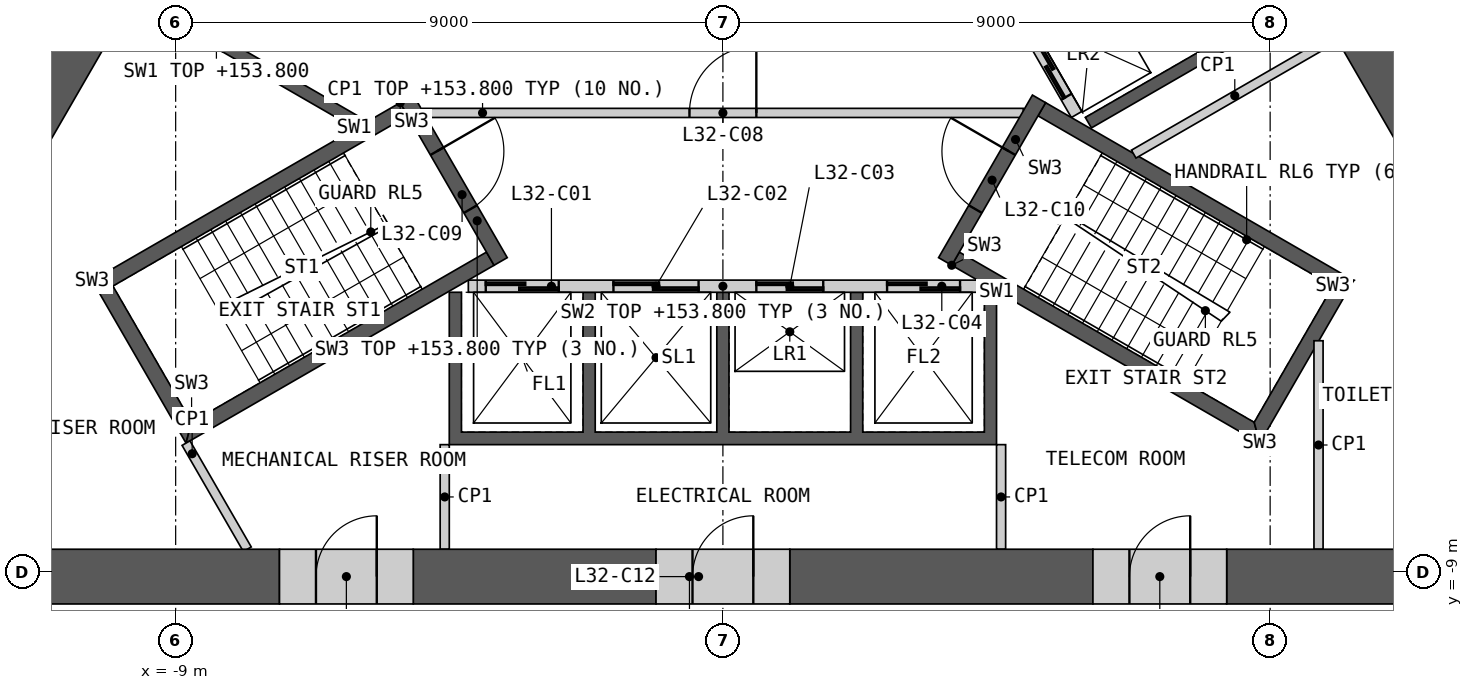
"""IFC4 building model, lengths in metres.
Left out: names, types, materials, properties, quantities, classifications, styles, units other than length and angle.
Written with IfcOpenShell. Run it as: python <this file> out.ifc"""

import sys

from ifc_helpers import new_model, si_unit, direction, frame, frame_2d, origin, place, context, subcontext, project, spatial, polyline, rectangle, outline, extrude, element, fill, save


model = new_model("IFC4")
c1 = context("Model", 3, precision=1e-05, world=origin(), true_north=direction((0.0, 1.0)))
c2 = subcontext(c1, "Body", "Model", "MODEL_VIEW")
j1 = project(units=[si_unit("LENGTHUNIT", "METRE"), si_unit("PLANEANGLEUNIT", "RADIAN")], contexts=[c1])
p1 = place(None, origin())
s1 = spatial("IfcSite", under=j1, at=p1, CompositionType="ELEMENT")
p2 = place(p1, origin())
s2 = spatial("IfcBuilding", under=s1, at=p2, CompositionType="ELEMENT")
p3 = place(p2, frame((0.0, 0.0, 150.0)))
s3 = spatial("IfcBuildingStorey", under=s2, at=p3, CompositionType="ELEMENT", Elevation=150.0)
p4 = place(p3, origin())
e1 = element("IfcWall", 1, at=p4, inside=s3, PredefinedType="SHEAR", context=c2, shape_type="SweptSolid", body=[
    extrude(outline(polyline([(4.5, -4.4), (4.5, -6.906), (-4.5, -6.906), (-4.5, -4.4), (-4.3, -4.4), (-4.3, -6.7), (-2.3, -6.7), (-2.3, -4.4), (-2.1, -4.4), (-2.1, -6.7), (-0.1, -6.7), (-0.1, -4.4), (0.1, -4.4), (0.1, -6.7), (2.1, -6.7), (2.1, -4.4), (2.3, -4.4), (2.3, -6.7), (4.3, -6.7), (4.3, -4.4), (4.5, -4.4)])), origin(), (0.0, 0.0, 1.0), 3.8),
])
p5 = place(p3, frame((-4.187, -4.3, 0.0), z_axis=(0.0, 0.0, 1.0), x_axis=(1.0, 0.0, 0.0)))
e2 = element("IfcWall", 2, at=p5, inside=s3, PredefinedType="SOLIDWALL", context=c2, shape_type="SweptSolid", body=[
    extrude(rectangle(XDim=8.373, YDim=0.2, at=frame_2d((4.187, 0.0))), origin(), (0.0, 0.0, 1.0), 3.8),
])
p6 = place(p5, frame((0.287, 0.0, 0.0)))
e3 = element("IfcOpeningElement", 3, at=p6, cuts=e2, PredefinedType="OPENING", context=c2, shape_type="SweptSolid", body=[
    extrude(rectangle(XDim=1.2, YDim=2.1, at=frame_2d((0.6, 1.05))), frame((0.0, 0.11, 0.0), z_axis=(0.0, -1.0, 0.0), x_axis=(1.0, 0.0, 0.0)), (0.0, 0.0, 1.0), 0.22),
])
p7 = place(p5, frame((2.387, 0.0, 0.0)))
e4 = element("IfcOpeningElement", 4, at=p7, cuts=e2, PredefinedType="OPENING", context=c2, shape_type="SweptSolid", body=[
    extrude(rectangle(XDim=1.4, YDim=2.1, at=frame_2d((0.7, 1.05))), frame((0.0, 0.11, 0.0), z_axis=(0.0, -1.0, 0.0), x_axis=(1.0, 0.0, 0.0)), (0.0, 0.0, 1.0), 0.22),
])
p8 = place(p5, frame((4.737, 0.0, 0.0)))
e5 = element("IfcOpeningElement", 5, at=p8, cuts=e2, PredefinedType="OPENING", context=c2, shape_type="SweptSolid", body=[
    extrude(rectangle(XDim=1.1, YDim=2.1, at=frame_2d((0.55, 1.05))), frame((0.0, 0.11, 0.0), z_axis=(0.0, -1.0, 0.0), x_axis=(1.0, 0.0, 0.0)), (0.0, 0.0, 1.0), 0.22),
])
p9 = place(p5, frame((6.887, 0.0, 0.0)))
e6 = element("IfcOpeningElement", 6, at=p9, cuts=e2, PredefinedType="OPENING", context=c2, shape_type="SweptSolid", body=[
    extrude(rectangle(XDim=1.2, YDim=2.1, at=frame_2d((0.6, 1.05))), frame((0.0, 0.11, 0.0), z_axis=(0.0, -1.0, 0.0), x_axis=(1.0, 0.0, 0.0)), (0.0, 0.0, 1.0), 0.22),
])
p10 = place(p3, origin())
e7 = element("IfcWall", 7, at=p10, inside=s3, PredefinedType="SHEAR", context=c2, shape_type="SweptSolid", body=[
    extrude(outline(polyline([(1.561, 6.097), (3.731, 7.35), (8.231, -0.444), (6.061, -1.697), (5.96, -1.524), (7.952, -0.374), (6.952, 1.358), (4.96, 0.208), (4.861, 0.381), (6.852, 1.531), (5.852, 3.263), (3.861, 2.113), (3.76, 2.287), (5.752, 3.437), (4.752, 5.169), (2.76, 4.019), (2.66, 4.192), (4.652, 5.342), (3.652, 7.074), (1.66, 5.924), (1.561, 6.097)])), origin(), (0.0, 0.0, 1.0), 3.8),
])
p11 = place(p3, frame((5.817, -1.476, 0.0), z_axis=(0.0, 0.0, 1.0), x_axis=(-0.500002616675, 0.866023893041, 0.0)))
e8 = element("IfcWall", 8, at=p11, inside=s3, PredefinedType="SOLIDWALL", context=c2, shape_type="SweptSolid", body=[
    extrude(rectangle(XDim=8.373, YDim=0.2, at=frame_2d((4.187, 0.0))), origin(), (0.0, 0.0, 1.0), 3.8),
])
p12 = place(p11, frame((0.337, 0.0, 0.0)))
e9 = element("IfcOpeningElement", 9, at=p12, cuts=e8, PredefinedType="OPENING", context=c2, shape_type="SweptSolid", body=[
    extrude(rectangle(XDim=1.1, YDim=2.1, at=frame_2d((0.55, 1.05))), frame((0.0, 0.11, 0.0), z_axis=(0.0, -1.0, 0.0), x_axis=(1.0, 0.0, 0.0)), (0.0, 0.0, 1.0), 0.22),
])
p13 = place(p11, frame((2.537, 0.0, 0.0)))
e10 = element("IfcOpeningElement", 10, at=p13, cuts=e8, PredefinedType="OPENING", context=c2, shape_type="SweptSolid", body=[
    extrude(rectangle(XDim=1.1, YDim=2.1, at=frame_2d((0.55, 1.05))), frame((0.0, 0.11, 0.0), z_axis=(0.0, -1.0, 0.0), x_axis=(1.0, 0.0, 0.0)), (0.0, 0.0, 1.0), 0.22),
])
p14 = place(p11, frame((4.737, 0.0, 0.0)))
e11 = element("IfcOpeningElement", 11, at=p14, cuts=e8, PredefinedType="OPENING", context=c2, shape_type="SweptSolid", body=[
    extrude(rectangle(XDim=1.1, YDim=2.1, at=frame_2d((0.55, 1.05))), frame((0.0, 0.11, 0.0), z_axis=(0.0, -1.0, 0.0), x_axis=(1.0, 0.0, 0.0)), (0.0, 0.0, 1.0), 0.22),
])
p15 = place(p3, origin())
e12 = element("IfcWall", 12, at=p15, inside=s3, PredefinedType="SHEAR", context=c2, shape_type="SweptSolid", body=[
    extrude(outline(polyline([(-6.061, -1.697), (-8.231, -0.444), (-8.131, -0.271), (-5.96, -1.524), (-6.061, -1.697)])), origin(), (0.0, 0.0, 1.0), 3.8),
])
p16 = place(p3, frame((-4.941, -1.45, 0.0), z_axis=(0.0, 0.0, 1.0), x_axis=(1.0, 0.0, 0.0)))
e13 = element("IfcWall", 13, at=p16, inside=s3, PredefinedType="PARTITIONING", context=c2, shape_type="SweptSolid", body=[
    extrude(rectangle(XDim=9.882, YDim=0.15, at=frame_2d((4.941, 0.0))), origin(), (0.0, 0.0, 1.0), 3.8),
])
p17 = place(p16, frame((4.391, 0.0, 0.0)))
e14 = element("IfcOpeningElement", 14, at=p17, cuts=e13, PredefinedType="OPENING", context=c2, shape_type="SweptSolid", body=[
    extrude(rectangle(XDim=1.1, YDim=2.1, at=frame_2d((0.55, 1.05))), frame((0.0, 0.085, 0.0), z_axis=(0.0, -1.0, 0.0), x_axis=(1.0, 0.0, 0.0)), (0.0, 0.0, 1.0), 0.17),
])
p18 = place(p3, origin())
e15 = element("IfcWall", 15, at=p18, inside=s3, PredefinedType="SHEAR", context=c2, shape_type="SweptSolid", body=[
    extrude(outline(polyline([(-5.307, -1.281), (-10.374, -4.206), (-10.032, -4.298), (-5.182, -1.498), (-5.307, -1.281)])), origin(), (0.0, 0.0, 1.0), 3.8),
])
p19 = place(p3, origin())
e16 = element("IfcWall", 16, at=p19, inside=s3, PredefinedType="SHEAR", context=c2, shape_type="SweptSolid", body=[
    extrude(outline(polyline([(-10.374, -4.206), (-8.83, -6.881), (-8.738, -6.539), (-10.032, -4.298), (-10.374, -4.206)])), origin(), (0.0, 0.0, 1.0), 3.8),
])
p20 = place(p3, origin())
e17 = element("IfcWall", 17, at=p20, inside=s3, PredefinedType="SHEAR", context=c2, shape_type="SweptSolid", body=[
    extrude(outline(polyline([(-8.738, -6.539), (-8.83, -6.881), (-3.763, -3.956), (-3.888, -3.739), (-8.738, -6.539)])), origin(), (0.0, 0.0, 1.0), 3.8),
])
p21 = place(p3, frame((-5.199, -1.219, 0.0), z_axis=(0.0, 0.0, 1.0), x_axis=(0.499982516597, -0.866035497597, 0.0)))
e18 = element("IfcWall", 18, at=p21, inside=s3, PredefinedType="SHEAR", context=c2, shape_type="SweptSolid", body=[
    extrude(rectangle(XDim=3.088, YDim=0.25, at=frame_2d((1.544, 0.0))), origin(), (0.0, 0.0, 1.0), 3.8),
])
p22 = place(p21, frame((0.994, 0.0, 0.0)))
e19 = element("IfcOpeningElement", 19, at=p22, cuts=e18, PredefinedType="OPENING", context=c2, shape_type="SweptSolid", body=[
    extrude(rectangle(XDim=1.1, YDim=2.1, at=frame_2d((0.55, 1.05))), frame((0.0, 0.135, 0.0), z_axis=(0.0, -1.0, 0.0), x_axis=(1.0, 0.0, 0.0)), (0.0, 0.0, 1.0), 0.27),
])
p23 = place(p3, origin())
e20 = element("IfcWall", 20, at=p23, inside=s3, PredefinedType="SHEAR", context=c2, shape_type="SweptSolid", body=[
    extrude(outline(polyline([(3.763, -3.956), (8.83, -6.881), (8.738, -6.539), (3.888, -3.739), (3.763, -3.956)])), origin(), (0.0, 0.0, 1.0), 3.8),
])
p24 = place(p3, origin())
e21 = element("IfcWall", 21, at=p24, inside=s3, PredefinedType="SHEAR", context=c2, shape_type="SweptSolid", body=[
    extrude(outline(polyline([(8.83, -6.881), (10.374, -4.206), (10.032, -4.298), (8.738, -6.539), (8.83, -6.881)])), origin(), (0.0, 0.0, 1.0), 3.8),
])
p25 = place(p3, origin())
e22 = element("IfcWall", 22, at=p25, inside=s3, PredefinedType="SHEAR", context=c2, shape_type="SweptSolid", body=[
    extrude(outline(polyline([(10.032, -4.298), (10.374, -4.206), (5.307, -1.281), (5.182, -1.498), (10.032, -4.298)])), origin(), (0.0, 0.0, 1.0), 3.8),
])
p26 = place(p3, frame((3.655, -3.893, 0.0), z_axis=(0.0, 0.0, 1.0), x_axis=(0.499982516597, 0.866035497597, 0.0)))
e23 = element("IfcWall", 23, at=p26, inside=s3, PredefinedType="SHEAR", context=c2, shape_type="SweptSolid", body=[
    extrude(rectangle(XDim=3.088, YDim=0.25, at=frame_2d((1.544, 0.0))), origin(), (0.0, 0.0, 1.0), 3.8),
])
p27 = place(p26, frame((0.994, 0.0, 0.0)))
e24 = element("IfcOpeningElement", 24, at=p27, cuts=e23, PredefinedType="OPENING", context=c2, shape_type="SweptSolid", body=[
    extrude(rectangle(XDim=1.1, YDim=2.1, at=frame_2d((0.55, 1.05))), frame((0.0, 0.135, 0.0), z_axis=(0.0, -1.0, 0.0), x_axis=(1.0, 0.0, 0.0)), (0.0, 0.0, 1.0), 0.27),
])
for number, where, z_axis, x_axis in (
    (25, (4.575, -6.906, 0.0), (0.0, 0.0, 1.0), (0.0, -1.0, 0.0)),
    (26, (-4.575, -6.906, 0.0), (0.0, 0.0, 1.0), (0.0, -1.0, 0.0)),
):
    element("IfcWall", number, at=place(p3, frame(where, z_axis=z_axis, x_axis=x_axis)), inside=s3, PredefinedType="PARTITIONING", context=c2, shape_type="SweptSolid", body=[
        extrude(rectangle(XDim=1.72, YDim=0.15, at=frame_2d((0.86, 0.0))), origin(), (0.0, 0.0, 1.0), 3.8),
    ])
p28 = place(p3, frame((10.081, -0.208, 0.0), z_axis=(0.0, 0.0, 1.0), x_axis=(-0.86600766878, -0.50003071667, 0.0)))
e27 = element("IfcWall", 27, at=p28, inside=s3, PredefinedType="PARTITIONING", context=c2, shape_type="SweptSolid", body=[
    extrude(rectangle(XDim=3.839, YDim=0.15, at=frame_2d((1.919, 0.0))), origin(), (0.0, 0.0, 1.0), 3.8),
])
p29 = place(p3, frame((9.796, -8.626, 0.0), z_axis=(0.0, 0.0, 1.0), x_axis=(0.0, 1.0, 0.0)))
e28 = element("IfcWall", 28, at=p29, inside=s3, PredefinedType="PARTITIONING", context=c2, shape_type="SweptSolid", body=[
    extrude(rectangle(XDim=3.429, YDim=0.15, at=frame_2d((1.714, 0.0))), origin(), (0.0, 0.0, 1.0), 3.8),
])
p30 = place(p3, frame((-8.83, -6.881, 0.0), z_axis=(0.0, 0.0, 1.0), x_axis=(0.500085890408, -0.865975809255, 0.0)))
e29 = element("IfcWall", 29, at=p30, inside=s3, PredefinedType="PARTITIONING", context=c2, shape_type="SweptSolid", body=[
    extrude(rectangle(XDim=2.016, YDim=0.15, at=frame_2d((1.008, 0.0))), origin(), (0.0, 0.0, 1.0), 3.8),
])
p31 = place(p3, frame((-14.941, -9.076, 0.0), z_axis=(0.0, 0.0, 1.0), x_axis=(1.0, 0.0, 0.0)))
e30 = element("IfcWall", 30, at=p31, inside=s3, PredefinedType="SHEAR", context=c2, shape_type="SweptSolid", body=[
    extrude(rectangle(XDim=7.649, YDim=0.9, at=frame_2d((3.824, 0.0))), origin(), (0.0, 0.0, 1.0), 3.8),
])
p32 = place(p3, frame((8.285, -9.076, 0.0), z_axis=(0.0, 0.0, 1.0), x_axis=(1.0, 0.0, 0.0)))
e31 = element("IfcWall", 31, at=p32, inside=s3, PredefinedType="SHEAR", context=c2, shape_type="SweptSolid", body=[
    extrude(rectangle(XDim=6.656, YDim=0.9, at=frame_2d((3.328, 0.0))), origin(), (0.0, 0.0, 1.0), 3.8),
])
p33 = place(p3, frame((1.1, -9.076, 0.0), z_axis=(0.0, 0.0, 1.0), x_axis=(1.0, 0.0, 0.0)))
e32 = element("IfcWall", 32, at=p33, inside=s3, PredefinedType="SHEAR", context=c2, shape_type="SweptSolid", body=[
    extrude(rectangle(XDim=4.985, YDim=0.9, at=frame_2d((2.493, 0.0))), origin(), (0.0, 0.0, 1.0), 3.8),
])
p34 = place(p3, frame((-5.093, -9.076, 0.0), z_axis=(0.0, 0.0, 1.0), x_axis=(1.0, 0.0, 0.0)))
e33 = element("IfcWall", 33, at=p34, inside=s3, PredefinedType="SHEAR", context=c2, shape_type="SweptSolid", body=[
    extrude(rectangle(XDim=3.992, YDim=0.9, at=frame_2d((1.996, 0.0))), origin(), (0.0, 0.0, 1.0), 3.8),
])
p35 = place(p3, frame((12.369, -3.272, 0.0), z_axis=(0.0, 0.0, 1.0), x_axis=(-0.499986781806, 0.866033035178, 0.0)))
e34 = element("IfcWall", 34, at=p35, inside=s3, PredefinedType="SHEAR", context=c2, shape_type="SweptSolid", body=[
    extrude(rectangle(XDim=7.595, YDim=0.9, at=frame_2d((3.798, 0.0))), origin(), (0.0, 0.0, 1.0), 3.8),
])
p36 = place(p3, frame((-10.06, 0.728, 0.0), z_axis=(0.0, 0.0, 1.0), x_axis=(-0.500021220092, -0.866013152012, 0.0)))
e35 = element("IfcWall", 35, at=p36, inside=s3, PredefinedType="SHEAR", context=c2, shape_type="SweptSolid", body=[
    extrude(rectangle(XDim=4.22, YDim=0.9, at=frame_2d((2.11, 0.0))), origin(), (0.0, 0.0, 1.0), 3.8),
])
p37 = place(p3, frame((-1.1, -9.076, 0.0), z_axis=(0.0, 0.0, 1.0), x_axis=(1.0, 0.0, 0.0)))
e36 = element("IfcWall", 36, at=p37, inside=s3, PredefinedType="SHEAR", context=c2, shape_type="SweptSolid", body=[
    extrude(rectangle(XDim=2.2, YDim=0.9, at=frame_2d((1.1, 0.0))), origin(), (0.0, 0.0, 1.0), 3.8),
])
p38 = place(p37, frame((0.6, 0.0, 0.0)))
e37 = element("IfcOpeningElement", 37, at=p38, cuts=e36, PredefinedType="OPENING", context=c2, shape_type="SweptSolid", body=[
    extrude(rectangle(XDim=1.0, YDim=2.1, at=frame_2d((0.5, 1.05))), frame((0.0, 0.46, 0.0), z_axis=(0.0, -1.0, 0.0), x_axis=(1.0, 0.0, 0.0)), (0.0, 0.0, 1.0), 0.92),
])
p39 = place(p3, frame((6.085, -9.076, 0.0), z_axis=(0.0, 0.0, 1.0), x_axis=(1.0, 0.0, 0.0)))
e38 = element("IfcWall", 38, at=p39, inside=s3, PredefinedType="SHEAR", context=c2, shape_type="SweptSolid", body=[
    extrude(rectangle(XDim=2.2, YDim=0.9, at=frame_2d((1.1, 0.0))), origin(), (0.0, 0.0, 1.0), 3.8),
])
p40 = place(p39, frame((0.6, 0.0, 0.0)))
e39 = element("IfcOpeningElement", 39, at=p40, cuts=e38, PredefinedType="OPENING", context=c2, shape_type="SweptSolid", body=[
    extrude(rectangle(XDim=1.0, YDim=2.1, at=frame_2d((0.5, 1.05))), frame((0.0, 0.46, 0.0), z_axis=(0.0, -1.0, 0.0), x_axis=(1.0, 0.0, 0.0)), (0.0, 0.0, 1.0), 0.92),
])
p41 = place(p3, frame((-7.292, -9.076, 0.0), z_axis=(0.0, 0.0, 1.0), x_axis=(1.0, 0.0, 0.0)))
e40 = element("IfcWall", 40, at=p41, inside=s3, PredefinedType="SHEAR", context=c2, shape_type="SweptSolid", body=[
    extrude(rectangle(XDim=2.2, YDim=0.9, at=frame_2d((1.1, 0.0))), origin(), (0.0, 0.0, 1.0), 3.8),
])
p42 = place(p41, frame((0.6, 0.0, 0.0)))
e41 = element("IfcOpeningElement", 41, at=p42, cuts=e40, PredefinedType="OPENING", context=c2, shape_type="SweptSolid", body=[
    extrude(rectangle(XDim=1.0, YDim=2.1, at=frame_2d((0.5, 1.05))), frame((0.0, 0.46, 0.0), z_axis=(0.0, -1.0, 0.0), x_axis=(1.0, 0.0, 0.0)), (0.0, 0.0, 1.0), 0.92),
])
p43 = place(p3, frame((-15.361, -2.754, 0.0), z_axis=(0.0, 0.0, 1.0), x_axis=(0.500004141693, 0.866023012564, 0.0)))
e42 = element("IfcWall", 42, at=p43, inside=s3, PredefinedType="PARTITIONING", context=c2, shape_type="SweptSolid", body=[
    extrude(rectangle(XDim=9.803, YDim=0.2, at=frame_2d((4.902, 0.0))), origin(), (0.0, 0.0, 1.0), 3.8),
])
p44 = place(p43, frame((4.052, 0.0, 0.0)))
e43 = element("IfcOpeningElement", 43, at=p44, cuts=e42, PredefinedType="OPENING", context=c2, shape_type="SweptSolid", body=[
    extrude(rectangle(XDim=1.8, YDim=2.1, at=frame_2d((0.9, 1.05))), frame((0.0, 0.11, 0.0), z_axis=(0.0, -1.0, 0.0), x_axis=(1.0, 0.0, 0.0)), (0.0, 0.0, 1.0), 0.22),
])
p45 = place(p3, frame((10.46, 5.736, 0.0), z_axis=(0.0, 0.0, 1.0), x_axis=(0.500004141693, -0.866023012564, 0.0)))
e44 = element("IfcWall", 44, at=p45, inside=s3, PredefinedType="PARTITIONING", context=c2, shape_type="SweptSolid", body=[
    extrude(rectangle(XDim=9.803, YDim=0.2, at=frame_2d((4.902, 0.0))), origin(), (0.0, 0.0, 1.0), 3.8),
])
p46 = place(p6, origin())
e45 = element("IfcDoor", 45, at=p46, inside=s3, OperationType="SLIDING_TO_LEFT", PredefinedType="DOOR", context=c2, shape_type="SweptSolid", body=[
    extrude(rectangle(XDim=1.2, YDim=2.1, at=frame_2d((0.6, 1.05))), frame((0.0, 0.025, 0.0), z_axis=(0.0, -1.0, 0.0), x_axis=(1.0, 0.0, 0.0)), (0.0, 0.0, 1.0), 0.05),
])
fill(e3, e45)
p47 = place(p7, origin())
e46 = element("IfcDoor", 46, at=p47, inside=s3, OperationType="SLIDING_TO_LEFT", PredefinedType="DOOR", context=c2, shape_type="SweptSolid", body=[
    extrude(rectangle(XDim=1.4, YDim=2.1, at=frame_2d((0.7, 1.05))), frame((0.0, 0.025, 0.0), z_axis=(0.0, -1.0, 0.0), x_axis=(1.0, 0.0, 0.0)), (0.0, 0.0, 1.0), 0.05),
])
fill(e4, e46)
p48 = place(p8, origin())
e47 = element("IfcDoor", 47, at=p48, inside=s3, OperationType="SLIDING_TO_LEFT", PredefinedType="DOOR", context=c2, shape_type="SweptSolid", body=[
    extrude(rectangle(XDim=1.1, YDim=2.1, at=frame_2d((0.55, 1.05))), frame((0.0, 0.025, 0.0), z_axis=(0.0, -1.0, 0.0), x_axis=(1.0, 0.0, 0.0)), (0.0, 0.0, 1.0), 0.05),
])
fill(e5, e47)
p49 = place(p9, origin())
e48 = element("IfcDoor", 48, at=p49, inside=s3, OperationType="SLIDING_TO_LEFT", PredefinedType="DOOR", context=c2, shape_type="SweptSolid", body=[
    extrude(rectangle(XDim=1.2, YDim=2.1, at=frame_2d((0.6, 1.05))), frame((0.0, 0.025, 0.0), z_axis=(0.0, -1.0, 0.0), x_axis=(1.0, 0.0, 0.0)), (0.0, 0.0, 1.0), 0.05),
])
fill(e6, e48)
p50 = place(p12, origin())
e49 = element("IfcDoor", 49, at=p50, inside=s3, OperationType="SLIDING_TO_LEFT", PredefinedType="DOOR", context=c2, shape_type="SweptSolid", body=[
    extrude(rectangle(XDim=1.1, YDim=2.1, at=frame_2d((0.55, 1.05))), frame((0.0, 0.025, 0.0), z_axis=(0.0, -1.0, 0.0), x_axis=(1.0, 0.0, 0.0)), (0.0, 0.0, 1.0), 0.05),
])
fill(e9, e49)
p51 = place(p17, origin())
e50 = element("IfcDoor", 50, at=p51, inside=s3, OperationType="SINGLE_SWING_RIGHT", PredefinedType="DOOR", context=c2, shape_type="SweptSolid", body=[
    extrude(rectangle(XDim=1.1, YDim=2.1, at=frame_2d((0.55, 1.05))), frame((0.0, 0.025, 0.0), z_axis=(0.0, -1.0, 0.0), x_axis=(1.0, 0.0, 0.0)), (0.0, 0.0, 1.0), 0.05),
])
fill(e14, e50)
p52 = place(p22, origin())
e51 = element("IfcDoor", 51, at=p52, inside=s3, OperationType="SINGLE_SWING_LEFT", PredefinedType="DOOR", context=c2, shape_type="SweptSolid", body=[
    extrude(rectangle(XDim=1.1, YDim=2.1, at=frame_2d((0.55, 1.05))), frame((0.0, 0.025, 0.0), z_axis=(0.0, -1.0, 0.0), x_axis=(1.0, 0.0, 0.0)), (0.0, 0.0, 1.0), 0.05),
])
fill(e19, e51)
p53 = place(p27, origin())
e52 = element("IfcDoor", 52, at=p53, inside=s3, OperationType="SINGLE_SWING_RIGHT", PredefinedType="DOOR", context=c2, shape_type="SweptSolid", body=[
    extrude(rectangle(XDim=1.1, YDim=2.1, at=frame_2d((0.55, 1.05))), frame((0.0, 0.025, 0.0), z_axis=(0.0, -1.0, 0.0), x_axis=(1.0, 0.0, 0.0)), (0.0, 0.0, 1.0), 0.05),
])
fill(e24, e52)
p54 = place(p38, origin())
e53 = element("IfcDoor", 53, at=p54, inside=s3, OperationType="SINGLE_SWING_RIGHT", PredefinedType="DOOR", context=c2, shape_type="SweptSolid", body=[
    extrude(rectangle(XDim=1.0, YDim=2.1, at=frame_2d((0.5, 1.05))), frame((0.0, 0.205, 0.0), z_axis=(0.0, -1.0, 0.0), x_axis=(1.0, 0.0, 0.0)), (0.0, 0.0, 1.0), 0.05),
])
fill(e37, e53)
p55 = place(p40, origin())
e54 = element("IfcDoor", 54, at=p55, inside=s3, OperationType="SINGLE_SWING_RIGHT", PredefinedType="DOOR", context=c2, shape_type="SweptSolid", body=[
    extrude(rectangle(XDim=1.0, YDim=2.1, at=frame_2d((0.5, 1.05))), frame((0.0, 0.205, 0.0), z_axis=(0.0, -1.0, 0.0), x_axis=(1.0, 0.0, 0.0)), (0.0, 0.0, 1.0), 0.05),
])
fill(e39, e54)
p56 = place(p42, origin())
e55 = element("IfcDoor", 55, at=p56, inside=s3, OperationType="SINGLE_SWING_RIGHT", PredefinedType="DOOR", context=c2, shape_type="SweptSolid", body=[
    extrude(rectangle(XDim=1.0, YDim=2.1, at=frame_2d((0.5, 1.05))), frame((0.0, 0.205, 0.0), z_axis=(0.0, -1.0, 0.0), x_axis=(1.0, 0.0, 0.0)), (0.0, 0.0, 1.0), 0.05),
])
fill(e41, e55)
save(model, sys.argv[1])
